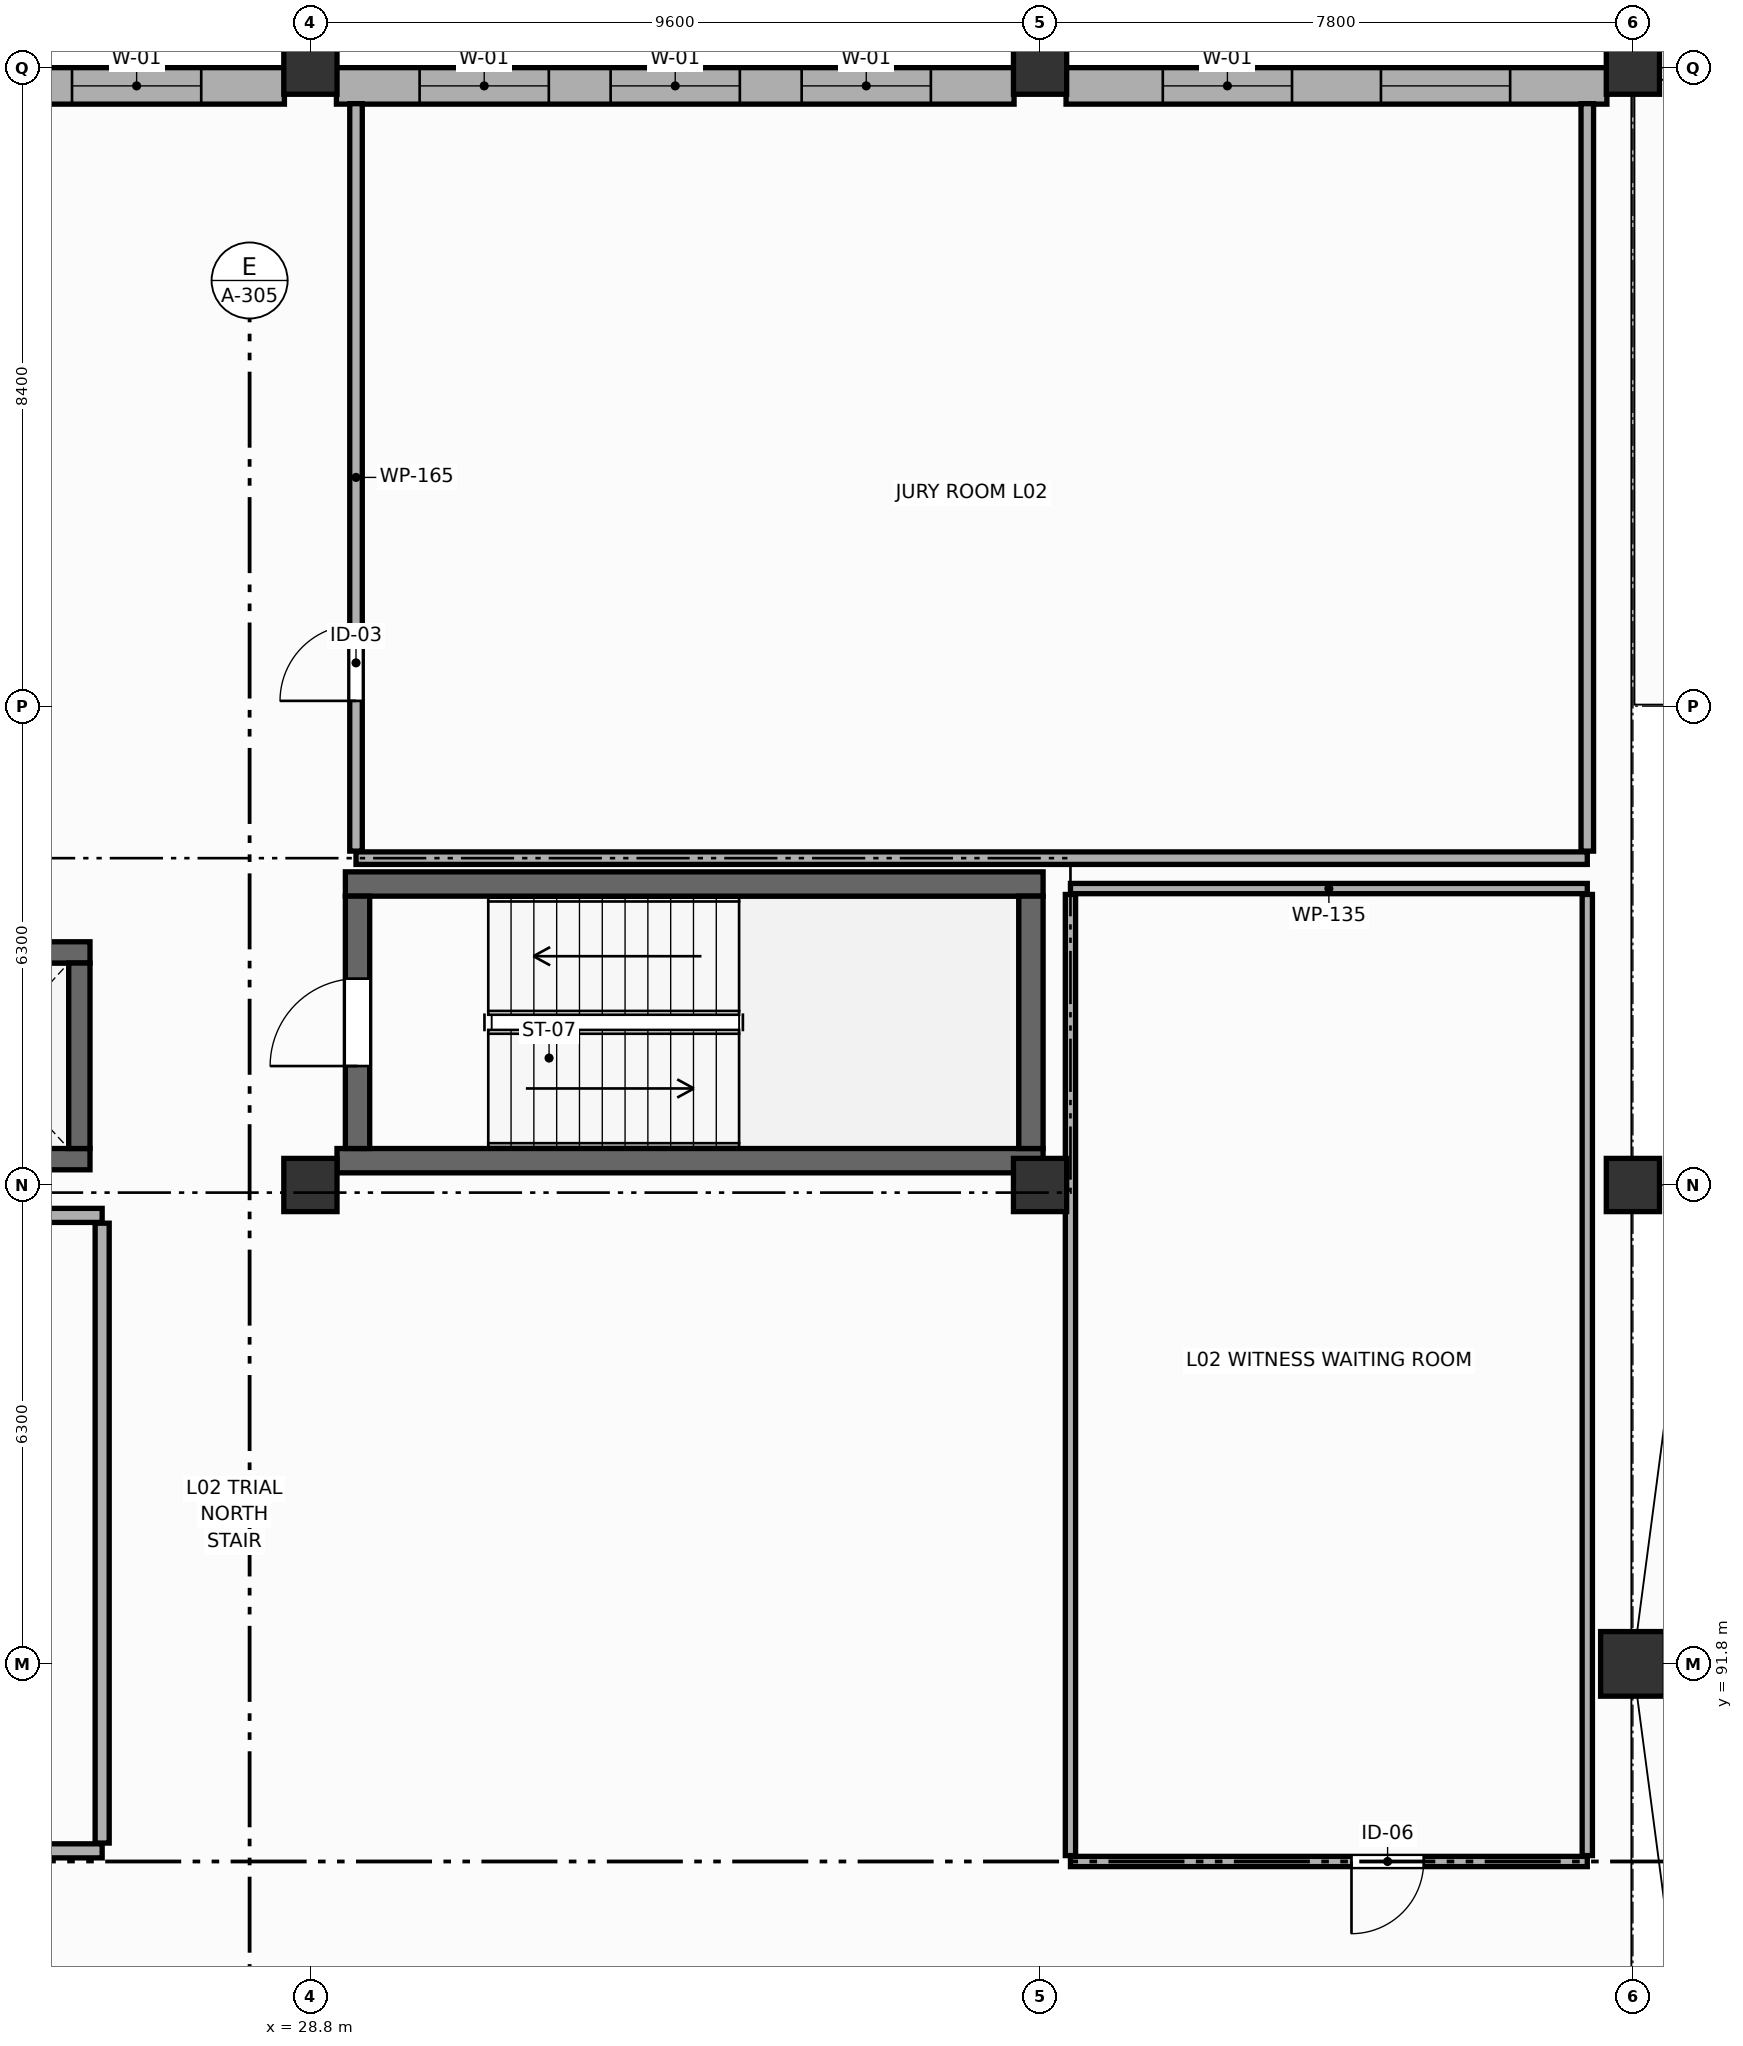
"""IFC4 building model, lengths in metres.
Left out: names, types, materials, properties, quantities, classifications, styles, units other than length and angle.
Written with IfcOpenShell. Run it as: python <this file> out.ifc"""

import sys

from ifc_helpers import new_model, si_unit, direction, frame, frame_2d, origin, origin_2d, place, context, subcontext, project, spatial, rectangle, circle, extrude, element, fill, save


model = new_model("IFC4")
c1 = context("Model", 3, precision=1e-05, world=origin(), true_north=direction((0.0, 1.0)))
c2 = subcontext(c1, "Body", "Model", "MODEL_VIEW")
j1 = project(units=[si_unit("LENGTHUNIT", "METRE"), si_unit("PLANEANGLEUNIT", "RADIAN")], contexts=[c1])
p1 = place(None, origin())
s1 = spatial("IfcSite", under=j1, at=p1, CompositionType="ELEMENT")
p2 = place(p1, origin())
s2 = spatial("IfcBuilding", under=s1, at=p2, CompositionType="ELEMENT")
p3 = place(p2, frame((0.0, 0.0, 5.4)))
s3 = spatial("IfcBuildingStorey", under=s2, at=p3, CompositionType="ELEMENT", Elevation=5.4)
p4 = place(p3, frame((46.2, 91.8, 0.0), z_axis=(0.0, 0.0, 1.0), x_axis=(1.0, 0.0, 0.0)))
e1 = element("IfcColumn", 1, at=p4, inside=s3, PredefinedType="COLUMN", context=c2, shape_type="SweptSolid", body=[
    extrude(circle(Radius=0.425, at=origin_2d()), origin(), (0.0, 0.0, 1.0), 4.5),
])
for number, where, z_axis, x_axis in (
    (2, (28.8, 98.1, 0.0), (0.0, 0.0, 1.0), (1.0, 0.0, 0.0)),
    (3, (28.8, 112.8, 0.0), (0.0, 0.0, 1.0), (1.0, 0.0, 0.0)),
    (4, (38.4, 98.1, 0.0), (0.0, 0.0, 1.0), (1.0, 0.0, 0.0)),
    (5, (38.4, 112.8, 0.0), (0.0, 0.0, 1.0), (1.0, 0.0, 0.0)),
    (6, (46.2, 98.1, 0.0), (0.0, 0.0, 1.0), (1.0, 0.0, 0.0)),
    (7, (46.2, 112.8, 0.0), (0.0, 0.0, 1.0), (1.0, 0.0, 0.0)),
):
    element("IfcColumn", number, at=place(p3, frame(where, z_axis=z_axis, x_axis=x_axis)), inside=s3, PredefinedType="COLUMN", context=c2, shape_type="SweptSolid", body=[
        extrude(rectangle(XDim=0.7, YDim=0.7, at=origin_2d()), origin(), (0.0, 0.0, 1.0), 4.5),
    ])
p5 = place(p3, frame((19.542, 112.56, 0.0), z_axis=(0.0, 0.0, 1.0), x_axis=(1.0, 0.0, 0.0)))
e8 = element("IfcWall", 8, at=p5, inside=s3, PredefinedType="STANDARD", context=c2, shape_type="SweptSolid", body=[
    extrude(rectangle(XDim=8.916, YDim=0.48, at=frame_2d((4.458, 0.0))), origin(), (0.0, 0.0, 1.0), 3.28),
])
p6 = place(p5, frame((1.095, 0.0, 0.76)))
e9 = element("IfcOpeningElement", 9, at=p6, cuts=e8, PredefinedType="OPENING", context=c2, shape_type="SweptSolid", body=[
    extrude(rectangle(XDim=1.7, YDim=2.3, at=frame_2d((0.85, 1.15))), frame((0.0, 0.25, 0.0), z_axis=(0.0, -1.0, 0.0), x_axis=(1.0, 0.0, 0.0)), (0.0, 0.0, 1.0), 0.5),
])
p7 = place(p5, frame((3.608, 0.0, 0.76)))
e10 = element("IfcOpeningElement", 10, at=p7, cuts=e8, PredefinedType="OPENING", context=c2, shape_type="SweptSolid", body=[
    extrude(rectangle(XDim=1.7, YDim=2.3, at=frame_2d((0.85, 1.15))), frame((0.0, 0.25, 0.0), z_axis=(0.0, -1.0, 0.0), x_axis=(1.0, 0.0, 0.0)), (0.0, 0.0, 1.0), 0.5),
])
p8 = place(p5, frame((6.121, 0.0, 0.76)))
e11 = element("IfcOpeningElement", 11, at=p8, cuts=e8, PredefinedType="OPENING", context=c2, shape_type="SweptSolid", body=[
    extrude(rectangle(XDim=1.7, YDim=2.3, at=frame_2d((0.85, 1.15))), frame((0.0, 0.25, 0.0), z_axis=(0.0, -1.0, 0.0), x_axis=(1.0, 0.0, 0.0)), (0.0, 0.0, 1.0), 0.5),
])
p9 = place(p3, frame((29.142, 112.56, 0.0), z_axis=(0.0, 0.0, 1.0), x_axis=(1.0, 0.0, 0.0)))
e12 = element("IfcWall", 12, at=p9, inside=s3, PredefinedType="STANDARD", context=c2, shape_type="SweptSolid", body=[
    extrude(rectangle(XDim=8.916, YDim=0.48, at=frame_2d((4.458, 0.0))), origin(), (0.0, 0.0, 1.0), 3.28),
])
p10 = place(p9, frame((1.095, 0.0, 0.76)))
e13 = element("IfcOpeningElement", 13, at=p10, cuts=e12, PredefinedType="OPENING", context=c2, shape_type="SweptSolid", body=[
    extrude(rectangle(XDim=1.7, YDim=2.3, at=frame_2d((0.85, 1.15))), frame((0.0, 0.25, 0.0), z_axis=(0.0, -1.0, 0.0), x_axis=(1.0, 0.0, 0.0)), (0.0, 0.0, 1.0), 0.5),
])
p11 = place(p9, frame((3.608, 0.0, 0.76)))
e14 = element("IfcOpeningElement", 14, at=p11, cuts=e12, PredefinedType="OPENING", context=c2, shape_type="SweptSolid", body=[
    extrude(rectangle(XDim=1.7, YDim=2.3, at=frame_2d((0.85, 1.15))), frame((0.0, 0.25, 0.0), z_axis=(0.0, -1.0, 0.0), x_axis=(1.0, 0.0, 0.0)), (0.0, 0.0, 1.0), 0.5),
])
p12 = place(p9, frame((6.121, 0.0, 0.76)))
e15 = element("IfcOpeningElement", 15, at=p12, cuts=e12, PredefinedType="OPENING", context=c2, shape_type="SweptSolid", body=[
    extrude(rectangle(XDim=1.7, YDim=2.3, at=frame_2d((0.85, 1.15))), frame((0.0, 0.25, 0.0), z_axis=(0.0, -1.0, 0.0), x_axis=(1.0, 0.0, 0.0)), (0.0, 0.0, 1.0), 0.5),
])
p13 = place(p3, frame((38.742, 112.56, 0.0), z_axis=(0.0, 0.0, 1.0), x_axis=(1.0, 0.0, 0.0)))
e16 = element("IfcWall", 16, at=p13, inside=s3, PredefinedType="STANDARD", context=c2, shape_type="SweptSolid", body=[
    extrude(rectangle(XDim=7.116, YDim=0.48, at=frame_2d((3.558, 0.0))), origin(), (0.0, 0.0, 1.0), 3.28),
])
p14 = place(p13, frame((1.273, 0.0, 0.76)))
e17 = element("IfcOpeningElement", 17, at=p14, cuts=e16, PredefinedType="OPENING", context=c2, shape_type="SweptSolid", body=[
    extrude(rectangle(XDim=1.7, YDim=2.3, at=frame_2d((0.85, 1.15))), frame((0.0, 0.25, 0.0), z_axis=(0.0, -1.0, 0.0), x_axis=(1.0, 0.0, 0.0)), (0.0, 0.0, 1.0), 0.5),
])
p15 = place(p13, frame((4.143, 0.0, 0.76)))
e18 = element("IfcOpeningElement", 18, at=p15, cuts=e16, PredefinedType="OPENING", context=c2, shape_type="SweptSolid", body=[
    extrude(rectangle(XDim=1.7, YDim=2.3, at=frame_2d((0.85, 1.15))), frame((0.0, 0.25, 0.0), z_axis=(0.0, -1.0, 0.0), x_axis=(1.0, 0.0, 0.0)), (0.0, 0.0, 1.0), 0.5),
])
p16 = place(p3, frame((29.26, 102.06, 0.0), z_axis=(0.0, 0.0, 1.0), x_axis=(1.0, 0.0, 0.0)))
e19 = element("IfcWall", 19, at=p16, inside=s3, PredefinedType="SHEAR", context=c2, shape_type="SweptSolid", body=[
    extrude(rectangle(XDim=9.18, YDim=0.32, at=frame_2d((4.59, 0.0))), origin(), (0.0, 0.0, 1.0), 4.24),
])
p17 = place(p3, frame((38.44, 98.42, 0.0), z_axis=(0.0, 0.0, 1.0), x_axis=(-1.0, 0.0, 0.0)))
e20 = element("IfcWall", 20, at=p17, inside=s3, PredefinedType="SHEAR", context=c2, shape_type="SweptSolid", body=[
    extrude(rectangle(XDim=9.29, YDim=0.32, at=frame_2d((4.645, 0.0))), origin(), (0.0, 0.0, 1.0), 4.24),
])
p18 = place(p3, frame((29.42, 98.58, 0.0), z_axis=(0.0, 0.0, 1.0), x_axis=(0.0, 1.0, 0.0)))
e21 = element("IfcWall", 21, at=p18, inside=s3, PredefinedType="SHEAR", context=c2, shape_type="SweptSolid", body=[
    extrude(rectangle(XDim=3.32, YDim=0.32, at=frame_2d((1.66, 0.0))), origin(), (0.0, 0.0, 1.0), 4.24),
])
p19 = place(p18, frame((1.085, 0.0, 0.0)))
e22 = element("IfcOpeningElement", 22, at=p19, cuts=e21, PredefinedType="OPENING", context=c2, shape_type="SweptSolid", body=[
    extrude(rectangle(XDim=1.15, YDim=2.2, at=frame_2d((0.575, 1.1))), frame((0.0, 0.17, 0.0), z_axis=(0.0, -1.0, 0.0), x_axis=(1.0, 0.0, 0.0)), (0.0, 0.0, 1.0), 0.34),
])
p20 = place(p3, frame((38.28, 101.9, 0.0), z_axis=(0.0, 0.0, 1.0), x_axis=(0.0, -1.0, 0.0)))
e23 = element("IfcWall", 23, at=p20, inside=s3, PredefinedType="SHEAR", context=c2, shape_type="SweptSolid", body=[
    extrude(rectangle(XDim=3.32, YDim=0.32, at=frame_2d((1.66, 0.0))), origin(), (0.0, 0.0, 1.0), 4.24),
])
p21 = place(p3, frame((23.1, 101.16, 0.0), z_axis=(0.0, 0.0, 1.0), x_axis=(1.0, 0.0, 0.0)))
e24 = element("IfcWall", 24, at=p21, inside=s3, PredefinedType="SHEAR", context=c2, shape_type="SweptSolid", body=[
    extrude(rectangle(XDim=2.8, YDim=0.28, at=frame_2d((1.4, 0.0))), origin(), (0.0, 0.0, 1.0), 4.24),
])
p22 = place(p3, frame((25.9, 98.44, 0.0), z_axis=(0.0, 0.0, 1.0), x_axis=(-1.0, 0.0, 0.0)))
e25 = element("IfcWall", 25, at=p22, inside=s3, PredefinedType="SHEAR", context=c2, shape_type="SweptSolid", body=[
    extrude(rectangle(XDim=2.8, YDim=0.28, at=frame_2d((1.4, 0.0))), origin(), (0.0, 0.0, 1.0), 4.24),
])
p23 = place(p22, frame((0.925, 0.0, 0.0)))
e26 = element("IfcOpeningElement", 26, at=p23, cuts=e25, PredefinedType="OPENING", context=c2, shape_type="SweptSolid", body=[
    extrude(rectangle(XDim=0.95, YDim=2.15, at=frame_2d((0.475, 1.075))), frame((0.0, 0.15, 0.0), z_axis=(0.0, -1.0, 0.0), x_axis=(1.0, 0.0, 0.0)), (0.0, 0.0, 1.0), 0.3),
])
p24 = place(p3, frame((25.76, 101.02, 0.0), z_axis=(0.0, 0.0, 1.0), x_axis=(0.0, -1.0, 0.0)))
e27 = element("IfcWall", 27, at=p24, inside=s3, PredefinedType="SHEAR", context=c2, shape_type="SweptSolid", body=[
    extrude(rectangle(XDim=2.44, YDim=0.28, at=frame_2d((1.22, 0.0))), origin(), (0.0, 0.0, 1.0), 4.24),
])
p25 = place(p3, frame((13.64, 97.7, 0.0), z_axis=(0.0, 0.0, 1.0), x_axis=(1.0, 0.0, 0.0)))
e28 = element("IfcWall", 28, at=p25, inside=s3, PredefinedType="PARTITIONING", context=c2, shape_type="SweptSolid", body=[
    extrude(rectangle(XDim=12.42, YDim=0.185, at=frame_2d((6.21, 0.0))), origin(), (0.0, 0.0, 1.0), 3.28),
])
p26 = place(p3, frame((26.06, 89.34, 0.0), z_axis=(0.0, 0.0, 1.0), x_axis=(-1.0, 0.0, 0.0)))
e29 = element("IfcWall", 29, at=p26, inside=s3, PredefinedType="PARTITIONING", context=c2, shape_type="SweptSolid", body=[
    extrude(rectangle(XDim=12.42, YDim=0.185, at=frame_2d((6.21, 0.0))), origin(), (0.0, 0.0, 1.0), 3.33),
])
p27 = place(p26, frame((1.808, 0.0, 0.0)))
e30 = element("IfcOpeningElement", 30, at=p27, cuts=e29, PredefinedType="OPENING", context=c2, shape_type="SweptSolid", body=[
    extrude(rectangle(XDim=2.0, YDim=2.5, at=frame_2d((1.0, 1.25))), frame((0.0, 0.103, 0.0), z_axis=(0.0, -1.0, 0.0), x_axis=(1.0, 0.0, 0.0)), (0.0, 0.0, 1.0), 0.205),
])
p28 = place(p3, frame((26.06, 97.597, 0.0), z_axis=(0.0, 0.0, 1.0), x_axis=(0.0, -1.0, 0.0)))
e31 = element("IfcWall", 31, at=p28, inside=s3, PredefinedType="PARTITIONING", context=c2, shape_type="SweptSolid", body=[
    extrude(rectangle(XDim=8.155, YDim=0.185, at=frame_2d((4.078, 0.0))), origin(), (0.0, 0.0, 1.0), 3.58),
])
p29 = place(p3, frame((45.6, 102.4, 0.0), z_axis=(0.0, 0.0, 1.0), x_axis=(-1.0, 0.0, 0.0)))
e32 = element("IfcWall", 32, at=p29, inside=s3, PredefinedType="PARTITIONING", context=c2, shape_type="SweptSolid", body=[
    extrude(rectangle(XDim=16.2, YDim=0.165, at=frame_2d((8.1, 0.0))), origin(), (0.0, 0.0, 1.0), 3.28),
])
p30 = place(p3, frame((29.4, 102.492, 0.0), z_axis=(0.0, 0.0, 1.0), x_axis=(0.0, 1.0, 0.0)))
e33 = element("IfcWall", 33, at=p30, inside=s3, PredefinedType="PARTITIONING", context=c2, shape_type="SweptSolid", body=[
    extrude(rectangle(XDim=9.833, YDim=0.165, at=frame_2d((4.917, 0.0))), origin(), (0.0, 0.0, 1.0), 3.58),
])
p31 = place(p30, frame((1.977, 0.0, 0.0)))
e34 = element("IfcOpeningElement", 34, at=p31, cuts=e33, PredefinedType="OPENING", context=c2, shape_type="SweptSolid", body=[
    extrude(rectangle(XDim=1.0, YDim=2.15, at=frame_2d((0.5, 1.075))), frame((0.0, 0.093, 0.0), z_axis=(0.0, -1.0, 0.0), x_axis=(1.0, 0.0, 0.0)), (0.0, 0.0, 1.0), 0.185),
])
p32 = place(p3, frame((45.6, 112.326, 0.0), z_axis=(0.0, 0.0, 1.0), x_axis=(0.0, -1.0, 0.0)))
e35 = element("IfcWall", 35, at=p32, inside=s3, PredefinedType="PARTITIONING", context=c2, shape_type="SweptSolid", body=[
    extrude(rectangle(XDim=9.833, YDim=0.165, at=frame_2d((4.917, 0.0))), origin(), (0.0, 0.0, 1.0), 3.62),
])
p33 = place(p3, frame((38.8, 102.0, 0.0), z_axis=(0.0, 0.0, 1.0), x_axis=(1.0, 0.0, 0.0)))
e36 = element("IfcWall", 36, at=p33, inside=s3, PredefinedType="PARTITIONING", context=c2, shape_type="SweptSolid", body=[
    extrude(rectangle(XDim=6.8, YDim=0.135, at=frame_2d((3.4, 0.0))), origin(), (0.0, 0.0, 1.0), 3.28),
])
p34 = place(p3, frame((45.6, 89.2, 0.0), z_axis=(0.0, 0.0, 1.0), x_axis=(-1.0, 0.0, 0.0)))
e37 = element("IfcWall", 37, at=p34, inside=s3, PredefinedType="PARTITIONING", context=c2, shape_type="SweptSolid", body=[
    extrude(rectangle(XDim=6.8, YDim=0.135, at=frame_2d((3.4, 0.0))), origin(), (0.0, 0.0, 1.0), 3.33),
])
p35 = place(p34, frame((2.153, 0.0, 0.0)))
e38 = element("IfcOpeningElement", 38, at=p35, cuts=e37, PredefinedType="OPENING", context=c2, shape_type="SweptSolid", body=[
    extrude(rectangle(XDim=0.95, YDim=2.15, at=frame_2d((0.475, 1.075))), frame((0.0, 0.077, 0.0), z_axis=(0.0, -1.0, 0.0), x_axis=(1.0, 0.0, 0.0)), (0.0, 0.0, 1.0), 0.155),
])
p36 = place(p3, frame((38.8, 89.278, 0.0), z_axis=(0.0, 0.0, 1.0), x_axis=(0.0, 1.0, 0.0)))
e39 = element("IfcWall", 39, at=p36, inside=s3, PredefinedType="PARTITIONING", context=c2, shape_type="SweptSolid", body=[
    extrude(rectangle(XDim=12.645, YDim=0.135, at=frame_2d((6.323, 0.0))), origin(), (0.0, 0.0, 1.0), 3.28),
])
p37 = place(p3, frame((45.6, 101.923, 0.0), z_axis=(0.0, 0.0, 1.0), x_axis=(0.0, -1.0, 0.0)))
e40 = element("IfcWall", 40, at=p37, inside=s3, PredefinedType="PARTITIONING", context=c2, shape_type="SweptSolid", body=[
    extrude(rectangle(XDim=12.645, YDim=0.135, at=frame_2d((6.323, 0.0))), origin(), (0.0, 0.0, 1.0), 3.57),
])
p38 = place(p8, origin())
e41 = element("IfcWindow", 41, at=p38, inside=s3, PartitioningType="SINGLE_PANEL", PredefinedType="WINDOW", context=c2, shape_type="SweptSolid", body=[
    extrude(rectangle(XDim=1.7, YDim=2.3, at=frame_2d((0.85, 1.15))), frame((0.0, 0.03, 0.0), z_axis=(0.0, -1.0, 0.0), x_axis=(1.0, 0.0, 0.0)), (0.0, 0.0, 1.0), 0.06),
])
fill(e11, e41)
p39 = place(p10, origin())
e42 = element("IfcWindow", 42, at=p39, inside=s3, PartitioningType="SINGLE_PANEL", PredefinedType="WINDOW", context=c2, shape_type="SweptSolid", body=[
    extrude(rectangle(XDim=1.7, YDim=2.3, at=frame_2d((0.85, 1.15))), frame((0.0, 0.03, 0.0), z_axis=(0.0, -1.0, 0.0), x_axis=(1.0, 0.0, 0.0)), (0.0, 0.0, 1.0), 0.06),
])
fill(e13, e42)
p40 = place(p11, origin())
e43 = element("IfcWindow", 43, at=p40, inside=s3, PartitioningType="SINGLE_PANEL", PredefinedType="WINDOW", context=c2, shape_type="SweptSolid", body=[
    extrude(rectangle(XDim=1.7, YDim=2.3, at=frame_2d((0.85, 1.15))), frame((0.0, 0.03, 0.0), z_axis=(0.0, -1.0, 0.0), x_axis=(1.0, 0.0, 0.0)), (0.0, 0.0, 1.0), 0.06),
])
fill(e14, e43)
p41 = place(p12, origin())
e44 = element("IfcWindow", 44, at=p41, inside=s3, PartitioningType="SINGLE_PANEL", PredefinedType="WINDOW", context=c2, shape_type="SweptSolid", body=[
    extrude(rectangle(XDim=1.7, YDim=2.3, at=frame_2d((0.85, 1.15))), frame((0.0, 0.03, 0.0), z_axis=(0.0, -1.0, 0.0), x_axis=(1.0, 0.0, 0.0)), (0.0, 0.0, 1.0), 0.06),
])
fill(e15, e44)
p42 = place(p14, origin())
e45 = element("IfcWindow", 45, at=p42, inside=s3, PartitioningType="SINGLE_PANEL", PredefinedType="WINDOW", context=c2, shape_type="SweptSolid", body=[
    extrude(rectangle(XDim=1.7, YDim=2.3, at=frame_2d((0.85, 1.15))), frame((0.0, 0.03, 0.0), z_axis=(0.0, -1.0, 0.0), x_axis=(1.0, 0.0, 0.0)), (0.0, 0.0, 1.0), 0.06),
])
fill(e17, e45)
p43 = place(p15, origin())
e46 = element("IfcWindow", 46, at=p43, inside=s3, PartitioningType="SINGLE_PANEL", PredefinedType="WINDOW", context=c2, shape_type="SweptSolid", body=[
    extrude(rectangle(XDim=1.7, YDim=2.3, at=frame_2d((0.85, 1.15))), frame((0.0, 0.03, 0.0), z_axis=(0.0, -1.0, 0.0), x_axis=(1.0, 0.0, 0.0)), (0.0, 0.0, 1.0), 0.06),
])
fill(e18, e46)
p44 = place(p19, origin())
e47 = element("IfcDoor", 47, at=p44, inside=s3, OperationType="SINGLE_SWING_LEFT", PredefinedType="DOOR", context=c2, shape_type="SweptSolid", body=[
    extrude(rectangle(XDim=1.15, YDim=2.2, at=frame_2d((0.575, 1.1))), frame((0.0, 0.025, 0.0), z_axis=(0.0, -1.0, 0.0), x_axis=(1.0, 0.0, 0.0)), (0.0, 0.0, 1.0), 0.05),
])
fill(e22, e47)
p45 = place(p31, origin())
e48 = element("IfcDoor", 48, at=p45, inside=s3, OperationType="SINGLE_SWING_LEFT", PredefinedType="DOOR", context=c2, shape_type="SweptSolid", body=[
    extrude(rectangle(XDim=1.0, YDim=2.15, at=frame_2d((0.5, 1.075))), frame((0.0, 0.025, 0.0), z_axis=(0.0, -1.0, 0.0), x_axis=(1.0, 0.0, 0.0)), (0.0, 0.0, 1.0), 0.05),
])
fill(e34, e48)
p46 = place(p35, origin())
e49 = element("IfcDoor", 49, at=p46, inside=s3, OperationType="SINGLE_SWING_RIGHT", PredefinedType="DOOR", context=c2, shape_type="SweptSolid", body=[
    extrude(rectangle(XDim=0.95, YDim=2.15, at=frame_2d((0.475, 1.075))), frame((0.0, 0.025, 0.0), z_axis=(0.0, -1.0, 0.0), x_axis=(1.0, 0.0, 0.0)), (0.0, 0.0, 1.0), 0.05),
])
fill(e38, e49)
save(model, sys.argv[1])
